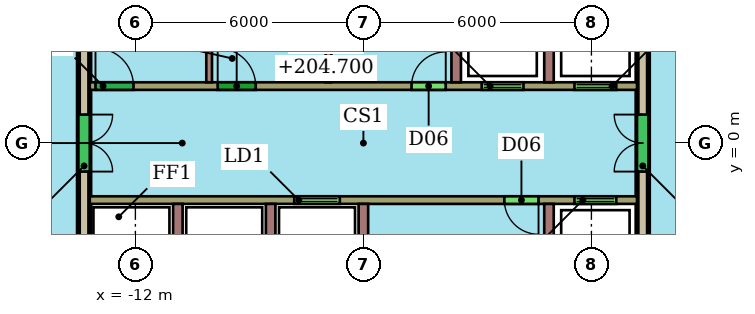
"""IFC4 building model, lengths in metres.
Left out: names, types, materials, properties, quantities, classifications, styles, units other than length and angle.
Written with IfcOpenShell. Run it as: python <this file> out.ifc"""

import sys

from ifc_helpers import new_model, si_unit, direction, frame, frame_2d, origin, place, context, subcontext, project, spatial, rectangle, extrude, element, fill, save


model = new_model("IFC4")
c1 = context("Model", 3, precision=1e-05, world=origin(), true_north=direction((0.0, 1.0)))
c2 = subcontext(c1, "Body", "Model", "MODEL_VIEW")
j1 = project(units=[si_unit("LENGTHUNIT", "METRE"), si_unit("PLANEANGLEUNIT", "RADIAN")], contexts=[c1])
p1 = place(None, origin())
s1 = spatial("IfcSite", under=j1, at=p1, CompositionType="ELEMENT")
p2 = place(p1, origin())
s2 = spatial("IfcBuilding", under=s1, at=p2, CompositionType="ELEMENT")
p3 = place(p2, frame((0.0, 0.0, 202.9)))
s3 = spatial("IfcBuildingStorey", under=s2, at=p3, CompositionType="ELEMENT", Elevation=202.9)
p4 = place(p3, frame((-13.35, 7.65, 0.0), z_axis=(0.0, 0.0, 1.0), x_axis=(0.0, -1.0, 0.0)))
e1 = element("IfcWall", 1, at=p4, inside=s3, PredefinedType="SHEAR", context=c2, shape_type="SweptSolid", body=[
    extrude(rectangle(XDim=15.3, YDim=0.3, at=frame_2d((7.65, 0.0))), origin(), (0.0, 0.0, 1.0), 3.3),
])
p5 = place(p4, frame((6.9, 0.0, 0.0)))
e2 = element("IfcOpeningElement", 2, at=p5, cuts=e1, PredefinedType="OPENING", context=c2, shape_type="SweptSolid", body=[
    extrude(rectangle(XDim=1.5, YDim=2.1, at=frame_2d((0.75, 1.05))), frame((0.0, 0.16, 0.0), z_axis=(0.0, -1.0, 0.0), x_axis=(1.0, 0.0, 0.0)), (0.0, 0.0, 1.0), 0.32),
])
p6 = place(p3, frame((1.35, -7.65, 0.0), z_axis=(0.0, 0.0, 1.0), x_axis=(0.0, 1.0, 0.0)))
e3 = element("IfcWall", 3, at=p6, inside=s3, PredefinedType="SHEAR", context=c2, shape_type="SweptSolid", body=[
    extrude(rectangle(XDim=15.3, YDim=0.3, at=frame_2d((7.65, 0.0))), origin(), (0.0, 0.0, 1.0), 3.3),
])
p7 = place(p6, frame((1.56, 0.0, 0.0)))
e4 = element("IfcOpeningElement", 4, at=p7, cuts=e3, PredefinedType="OPENING", context=c2, shape_type="SweptSolid", body=[
    extrude(rectangle(XDim=1.0, YDim=2.1, at=frame_2d((0.5, 1.05))), frame((0.0, 0.16, 0.0), z_axis=(0.0, -1.0, 0.0), x_axis=(1.0, 0.0, 0.0)), (0.0, 0.0, 1.0), 0.32),
])
p8 = place(p6, frame((6.9, 0.0, 0.0)))
e5 = element("IfcOpeningElement", 5, at=p8, cuts=e3, PredefinedType="OPENING", context=c2, shape_type="SweptSolid", body=[
    extrude(rectangle(XDim=1.5, YDim=2.1, at=frame_2d((0.75, 1.05))), frame((0.0, 0.16, 0.0), z_axis=(0.0, -1.0, 0.0), x_axis=(1.0, 0.0, 0.0)), (0.0, 0.0, 1.0), 0.32),
])
p9 = place(p3, frame((-13.2, 1.5, 0.0), z_axis=(0.0, 0.0, 1.0), x_axis=(1.0, 0.0, 0.0)))
e6 = element("IfcWall", 6, at=p9, inside=s3, PredefinedType="SHEAR", context=c2, shape_type="SweptSolid", body=[
    extrude(rectangle(XDim=14.4, YDim=0.2, at=frame_2d((7.2, 0.0))), origin(), (0.0, 0.0, 1.0), 3.3),
])
p10 = place(p9, frame((10.312, 0.0, 0.0)))
e7 = element("IfcOpeningElement", 7, at=p10, cuts=e6, PredefinedType="OPENING", context=c2, shape_type="SweptSolid", body=[
    extrude(rectangle(XDim=1.1, YDim=2.1, at=frame_2d((0.55, 1.05))), frame((0.0, 0.11, 0.0), z_axis=(0.0, -1.0, 0.0), x_axis=(1.0, 0.0, 0.0)), (0.0, 0.0, 1.0), 0.22),
])
p11 = place(p9, frame((12.754, 0.0, 0.0)))
e8 = element("IfcOpeningElement", 8, at=p11, cuts=e6, PredefinedType="OPENING", context=c2, shape_type="SweptSolid", body=[
    extrude(rectangle(XDim=1.1, YDim=2.1, at=frame_2d((0.55, 1.05))), frame((0.0, 0.11, 0.0), z_axis=(0.0, -1.0, 0.0), x_axis=(1.0, 0.0, 0.0)), (0.0, 0.0, 1.0), 0.22),
])
p12 = place(p9, frame((0.15, 0.0, 0.0)))
e9 = element("IfcOpeningElement", 9, at=p12, cuts=e6, PredefinedType="OPENING", context=c2, shape_type="SweptSolid", body=[
    extrude(rectangle(XDim=1.0, YDim=2.1, at=frame_2d((0.5, 1.05))), frame((0.0, 0.11, 0.0), z_axis=(0.0, -1.0, 0.0), x_axis=(1.0, 0.0, 0.0)), (0.0, 0.0, 1.0), 0.22),
])
p13 = place(p9, frame((3.365, 0.0, 0.0)))
e10 = element("IfcOpeningElement", 10, at=p13, cuts=e6, PredefinedType="OPENING", context=c2, shape_type="SweptSolid", body=[
    extrude(rectangle(XDim=1.0, YDim=2.1, at=frame_2d((0.5, 1.05))), frame((0.0, 0.11, 0.0), z_axis=(0.0, -1.0, 0.0), x_axis=(1.0, 0.0, 0.0)), (0.0, 0.0, 1.0), 0.22),
])
p14 = place(p9, frame((8.467, 0.0, 0.0)))
e11 = element("IfcOpeningElement", 11, at=p14, cuts=e6, PredefinedType="OPENING", context=c2, shape_type="SweptSolid", body=[
    extrude(rectangle(XDim=0.9, YDim=2.1, at=frame_2d((0.45, 1.05))), frame((0.0, 0.11, 0.0), z_axis=(0.0, -1.0, 0.0), x_axis=(1.0, 0.0, 0.0)), (0.0, 0.0, 1.0), 0.22),
])
p15 = place(p3, frame((1.2, -1.5, 0.0), z_axis=(0.0, 0.0, 1.0), x_axis=(-1.0, 0.0, 0.0)))
e12 = element("IfcWall", 12, at=p15, inside=s3, PredefinedType="SHEAR", context=c2, shape_type="SweptSolid", body=[
    extrude(rectangle(XDim=14.4, YDim=0.2, at=frame_2d((7.2, 0.0))), origin(), (0.0, 0.0, 1.0), 3.3),
])
p16 = place(p15, frame((7.821, 0.0, 0.0)))
e13 = element("IfcOpeningElement", 13, at=p16, cuts=e12, PredefinedType="OPENING", context=c2, shape_type="SweptSolid", body=[
    extrude(rectangle(XDim=1.2, YDim=2.1, at=frame_2d((0.6, 1.05))), frame((0.0, 0.11, 0.0), z_axis=(0.0, -1.0, 0.0), x_axis=(1.0, 0.0, 0.0)), (0.0, 0.0, 1.0), 0.22),
])
p17 = place(p15, frame((0.546, 0.0, 0.0)))
e14 = element("IfcOpeningElement", 14, at=p17, cuts=e12, PredefinedType="OPENING", context=c2, shape_type="SweptSolid", body=[
    extrude(rectangle(XDim=1.1, YDim=2.1, at=frame_2d((0.55, 1.05))), frame((0.0, 0.11, 0.0), z_axis=(0.0, -1.0, 0.0), x_axis=(1.0, 0.0, 0.0)), (0.0, 0.0, 1.0), 0.22),
])
p18 = place(p15, frame((2.592, 0.0, 0.0)))
e15 = element("IfcOpeningElement", 15, at=p18, cuts=e12, PredefinedType="OPENING", context=c2, shape_type="SweptSolid", body=[
    extrude(rectangle(XDim=0.9, YDim=2.1, at=frame_2d((0.45, 1.05))), frame((0.0, 0.11, 0.0), z_axis=(0.0, -1.0, 0.0), x_axis=(1.0, 0.0, 0.0)), (0.0, 0.0, 1.0), 0.22),
])
for number, where, z_axis, x_axis in (
    (16, (-3.558, 1.6, 0.0), (0.0, 0.0, 1.0), (0.0, 1.0, 0.0)),
    (17, (-1.117, 1.6, 0.0), (0.0, 0.0, 1.0), (0.0, 1.0, 0.0)),
):
    element("IfcWall", number, at=place(p3, frame(where, z_axis=z_axis, x_axis=x_axis)), inside=s3, PredefinedType="SHEAR", context=c2, shape_type="SweptSolid", body=[
        extrude(rectangle(XDim=1.83, YDim=0.25, at=frame_2d((0.915, 0.0))), origin(), (0.0, 0.0, 1.0), 3.3),
    ])
for number, where, z_axis, x_axis in (
    (18, (-10.06, 1.6, 0.0), (0.0, 0.0, 1.0), (0.0, 1.0, 0.0)),
    (19, (-6.919, 1.6, 0.0), (0.0, 0.0, 1.0), (0.0, 1.0, 0.0)),
):
    element("IfcWall", number, at=place(p3, frame(where, z_axis=z_axis, x_axis=x_axis)), inside=s3, PredefinedType="PARTITIONING", context=c2, shape_type="SweptSolid", body=[
        extrude(rectangle(XDim=1.83, YDim=0.15, at=frame_2d((0.915, 0.0))), origin(), (0.0, 0.0, 1.0), 3.3),
    ])
for number, where, z_axis, x_axis in (
    (20, (-10.883, -1.6, 0.0), (0.0, 0.0, 1.0), (0.0, -1.0, 0.0)),
    (21, (-8.442, -1.6, 0.0), (0.0, 0.0, 1.0), (0.0, -1.0, 0.0)),
    (22, (-6.0, -1.6, 0.0), (0.0, 0.0, 1.0), (0.0, -1.0, 0.0)),
    (23, (-1.117, -1.6, 0.0), (0.0, 0.0, 1.0), (0.0, -1.0, 0.0)),
):
    element("IfcWall", number, at=place(p3, frame(where, z_axis=z_axis, x_axis=x_axis)), inside=s3, PredefinedType="SHEAR", context=c2, shape_type="SweptSolid", body=[
        extrude(rectangle(XDim=1.83, YDim=0.25, at=frame_2d((0.915, 0.0))), origin(), (0.0, 0.0, 1.0), 3.3),
    ])
p19 = place(p5, origin())
e24 = element("IfcDoor", 24, at=p19, inside=s3, OperationType="DOUBLE_DOOR_SINGLE_SWING", PredefinedType="NOTDEFINED", context=c2, shape_type="SweptSolid", body=[
    extrude(rectangle(XDim=1.5, YDim=2.1, at=frame_2d((0.75, 1.05))), frame((0.0, 0.025, 0.0), z_axis=(0.0, -1.0, 0.0), x_axis=(1.0, 0.0, 0.0)), (0.0, 0.0, 1.0), 0.05),
])
fill(e2, e24)
p20 = place(p8, origin())
e25 = element("IfcDoor", 25, at=p20, inside=s3, OperationType="DOUBLE_DOOR_SINGLE_SWING", PredefinedType="NOTDEFINED", context=c2, shape_type="SweptSolid", body=[
    extrude(rectangle(XDim=1.5, YDim=2.1, at=frame_2d((0.75, 1.05))), frame((0.0, 0.025, 0.0), z_axis=(0.0, -1.0, 0.0), x_axis=(1.0, 0.0, 0.0)), (0.0, 0.0, 1.0), 0.05),
])
fill(e5, e25)
p21 = place(p10, origin())
e26 = element("IfcDoor", 26, at=p21, inside=s3, OperationType="DOUBLE_DOOR_SLIDING", PredefinedType="NOTDEFINED", context=c2, shape_type="SweptSolid", body=[
    extrude(rectangle(XDim=1.1, YDim=2.1, at=frame_2d((0.55, 1.05))), frame((0.0, 0.025, 0.0), z_axis=(0.0, -1.0, 0.0), x_axis=(1.0, 0.0, 0.0)), (0.0, 0.0, 1.0), 0.05),
])
fill(e7, e26)
p22 = place(p11, origin())
e27 = element("IfcDoor", 27, at=p22, inside=s3, OperationType="DOUBLE_DOOR_SLIDING", PredefinedType="NOTDEFINED", context=c2, shape_type="SweptSolid", body=[
    extrude(rectangle(XDim=1.1, YDim=2.1, at=frame_2d((0.55, 1.05))), frame((0.0, 0.025, 0.0), z_axis=(0.0, -1.0, 0.0), x_axis=(1.0, 0.0, 0.0)), (0.0, 0.0, 1.0), 0.05),
])
fill(e8, e27)
p23 = place(p12, origin())
e28 = element("IfcDoor", 28, at=p23, inside=s3, OperationType="SINGLE_SWING_LEFT", PredefinedType="NOTDEFINED", context=c2, shape_type="SweptSolid", body=[
    extrude(rectangle(XDim=1.0, YDim=2.1, at=frame_2d((0.5, 1.05))), frame((0.0, 0.025, 0.0), z_axis=(0.0, -1.0, 0.0), x_axis=(1.0, 0.0, 0.0)), (0.0, 0.0, 1.0), 0.05),
])
fill(e9, e28)
p24 = place(p13, origin())
e29 = element("IfcDoor", 29, at=p24, inside=s3, OperationType="SINGLE_SWING_LEFT", PredefinedType="NOTDEFINED", context=c2, shape_type="SweptSolid", body=[
    extrude(rectangle(XDim=1.0, YDim=2.1, at=frame_2d((0.5, 1.05))), frame((0.0, 0.025, 0.0), z_axis=(0.0, -1.0, 0.0), x_axis=(1.0, 0.0, 0.0)), (0.0, 0.0, 1.0), 0.05),
])
fill(e10, e29)
p25 = place(p14, origin())
e30 = element("IfcDoor", 30, at=p25, inside=s3, OperationType="SINGLE_SWING_RIGHT", PredefinedType="NOTDEFINED", context=c2, shape_type="SweptSolid", body=[
    extrude(rectangle(XDim=0.9, YDim=2.1, at=frame_2d((0.45, 1.05))), frame((0.0, 0.025, 0.0), z_axis=(0.0, -1.0, 0.0), x_axis=(1.0, 0.0, 0.0)), (0.0, 0.0, 1.0), 0.05),
])
fill(e11, e30)
p26 = place(p16, origin())
e31 = element("IfcDoor", 31, at=p26, inside=s3, OperationType="DOUBLE_DOOR_SLIDING", PredefinedType="NOTDEFINED", context=c2, shape_type="SweptSolid", body=[
    extrude(rectangle(XDim=1.2, YDim=2.1, at=frame_2d((0.6, 1.05))), frame((0.0, 0.025, 0.0), z_axis=(0.0, -1.0, 0.0), x_axis=(1.0, 0.0, 0.0)), (0.0, 0.0, 1.0), 0.05),
])
fill(e13, e31)
p27 = place(p17, origin())
e32 = element("IfcDoor", 32, at=p27, inside=s3, OperationType="DOUBLE_DOOR_SLIDING", PredefinedType="NOTDEFINED", context=c2, shape_type="SweptSolid", body=[
    extrude(rectangle(XDim=1.1, YDim=2.1, at=frame_2d((0.55, 1.05))), frame((0.0, 0.025, 0.0), z_axis=(0.0, -1.0, 0.0), x_axis=(1.0, 0.0, 0.0)), (0.0, 0.0, 1.0), 0.05),
])
fill(e14, e32)
p28 = place(p18, origin())
e33 = element("IfcDoor", 33, at=p28, inside=s3, OperationType="SINGLE_SWING_LEFT", PredefinedType="NOTDEFINED", context=c2, shape_type="SweptSolid", body=[
    extrude(rectangle(XDim=0.9, YDim=2.1, at=frame_2d((0.45, 1.05))), frame((0.0, 0.025, 0.0), z_axis=(0.0, -1.0, 0.0), x_axis=(1.0, 0.0, 0.0)), (0.0, 0.0, 1.0), 0.05),
])
fill(e15, e33)
save(model, sys.argv[1])
